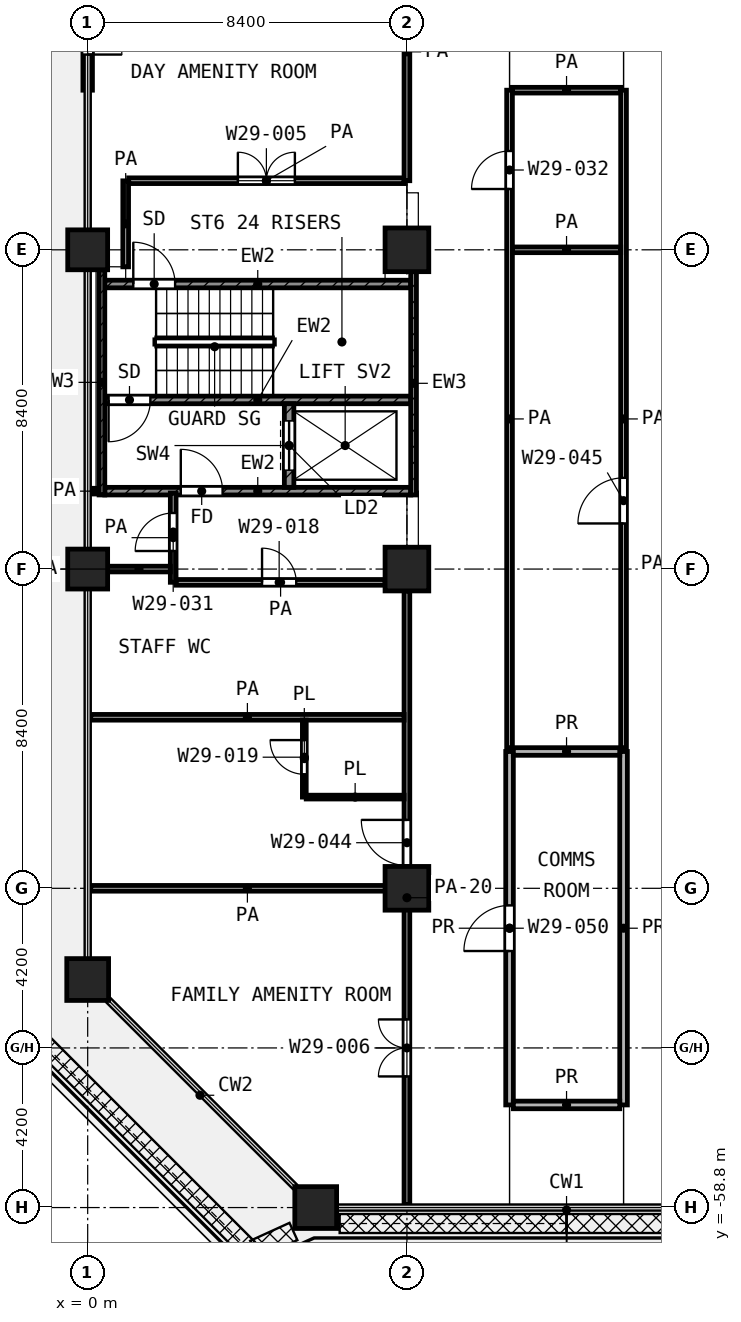
"""IFC4 building model, lengths in metres.
Left out: names, types, materials, properties, quantities, classifications, styles, units other than length and angle.
Written with IfcOpenShell. Run it as: python <this file> out.ifc"""

import sys

from ifc_helpers import new_model, si_unit, direction, frame, frame_2d, origin, origin_2d, place, context, subcontext, project, spatial, rectangle, extrude, element, fill, save


model = new_model("IFC4")
c1 = context("Model", 3, precision=1e-05, world=origin(), true_north=direction((0.0, 1.0)))
c2 = subcontext(c1, "Body", "Model", "MODEL_VIEW")
j1 = project(units=[si_unit("LENGTHUNIT", "METRE"), si_unit("PLANEANGLEUNIT", "RADIAN")], contexts=[c1])
p1 = place(None, origin())
s1 = spatial("IfcSite", under=j1, at=p1, CompositionType="ELEMENT")
p2 = place(p1, origin())
s2 = spatial("IfcBuilding", under=s1, at=p2, CompositionType="ELEMENT")
p3 = place(p2, frame((0.0, 0.0, 128.2)))
s3 = spatial("IfcBuildingStorey", under=s2, at=p3, CompositionType="ELEMENT", Elevation=128.2)
p4 = place(p3, frame((0.0, -33.6, 0.0), z_axis=(0.0, 0.0, 1.0), x_axis=(1.0, 0.0, 0.0)))
e1 = element("IfcColumn", 1, at=p4, inside=s3, PredefinedType="COLUMN", context=c2, shape_type="SweptSolid", body=[
    extrude(rectangle(XDim=1.05, YDim=1.05, at=origin_2d()), origin(), (0.0, 0.0, 1.0), 4.2),
])
p5 = place(p3, frame((8.4, -33.6, 0.0), z_axis=(0.0, 0.0, 1.0), x_axis=(1.0, 0.0, 0.0)))
e2 = element("IfcColumn", 2, at=p5, inside=s3, PredefinedType="COLUMN", context=c2, shape_type="SweptSolid", body=[
    extrude(rectangle(XDim=1.15, YDim=1.15, at=origin_2d()), origin(), (0.0, 0.0, 1.0), 4.2),
])
p6 = place(p3, frame((0.0, -42.0, 0.0), z_axis=(0.0, 0.0, 1.0), x_axis=(1.0, 0.0, 0.0)))
e3 = element("IfcColumn", 3, at=p6, inside=s3, PredefinedType="COLUMN", context=c2, shape_type="SweptSolid", body=[
    extrude(rectangle(XDim=1.05, YDim=1.05, at=origin_2d()), origin(), (0.0, 0.0, 1.0), 4.2),
])
for number, where, z_axis, x_axis in (
    (4, (8.4, -42.0, 0.0), (0.0, 0.0, 1.0), (1.0, 0.0, 0.0)),
    (5, (8.4, -50.4, 0.0), (0.0, 0.0, 1.0), (1.0, 0.0, 0.0)),
):
    element("IfcColumn", number, at=place(p3, frame(where, z_axis=z_axis, x_axis=x_axis)), inside=s3, PredefinedType="COLUMN", context=c2, shape_type="SweptSolid", body=[
        extrude(rectangle(XDim=1.15, YDim=1.15, at=origin_2d()), origin(), (0.0, 0.0, 1.0), 4.2),
    ])
for number, where, z_axis, x_axis in (
    (6, (0.0, -52.8, 0.0), (0.0, 0.0, 1.0), (1.0, 0.0, 0.0)),
    (7, (6.0, -58.8, 0.0), (0.0, 0.0, 1.0), (1.0, 0.0, 0.0)),
):
    element("IfcColumn", number, at=place(p3, frame(where, z_axis=z_axis, x_axis=x_axis)), inside=s3, PredefinedType="COLUMN", context=c2, shape_type="SweptSolid", body=[
        extrude(rectangle(XDim=1.1, YDim=1.1, at=origin_2d()), origin(), (0.0, 0.0, 1.0), 4.2),
    ])
p7 = place(p3, frame((0.0, -25.725, 0.0), z_axis=(0.0, 0.0, 1.0), x_axis=(0.0, -1.0, 0.0)))
e8 = element("IfcWall", 8, at=p7, inside=s3, PredefinedType="SOLIDWALL", context=c2, shape_type="SweptSolid", body=[
    extrude(rectangle(XDim=3.675, YDim=0.25, at=frame_2d((1.837, 0.0))), origin(), (0.0, 0.0, 1.0), 3.48),
])
p8 = place(p7, frame((0.938, 0.0, 0.0)))
e9 = element("IfcOpeningElement", 9, at=p8, cuts=e8, PredefinedType="OPENING", context=c2, shape_type="SweptSolid", body=[
    extrude(rectangle(XDim=1.8, YDim=2.1, at=frame_2d((0.9, 1.05))), frame((0.0, 0.135, 0.0), z_axis=(0.0, -1.0, 0.0), x_axis=(1.0, 0.0, 0.0)), (0.0, 0.0, 1.0), 0.27),
])
p9 = place(p3, frame((0.375, -40.05, 0.0), z_axis=(0.0, 0.0, 1.0), x_axis=(0.0, 1.0, 0.0)))
e10 = element("IfcWall", 10, at=p9, inside=s3, PredefinedType="SHEAR", context=c2, shape_type="SweptSolid", body=[
    extrude(rectangle(XDim=5.925, YDim=0.15, at=frame_2d((2.962, 0.0))), origin(), (0.0, 0.0, 1.0), 3.6),
])
p10 = place(p3, frame((8.575, -40.05, 0.0), z_axis=(0.0, 0.0, 1.0), x_axis=(0.0, 1.0, 0.0)))
e11 = element("IfcWall", 11, at=p10, inside=s3, PredefinedType="SHEAR", context=c2, shape_type="SweptSolid", body=[
    extrude(rectangle(XDim=5.875, YDim=0.15, at=frame_2d((2.938, 0.0))), origin(), (0.0, 0.0, 1.0), 3.6),
])
p11 = place(p3, frame((0.45, -34.5, 0.0), z_axis=(0.0, 0.0, 1.0), x_axis=(1.0, 0.0, 0.0)))
e12 = element("IfcWall", 12, at=p11, inside=s3, PredefinedType="SHEAR", context=c2, shape_type="SweptSolid", body=[
    extrude(rectangle(XDim=8.05, YDim=0.2, at=frame_2d((4.025, 0.0))), origin(), (0.0, 0.0, 1.0), 3.6),
])
p12 = place(p11, frame((0.75, 0.0, 0.0)))
e13 = element("IfcOpeningElement", 13, at=p12, cuts=e12, PredefinedType="OPENING", context=c2, shape_type="SweptSolid", body=[
    extrude(rectangle(XDim=1.1, YDim=2.1, at=frame_2d((0.55, 1.05))), frame((0.0, 0.11, 0.0), z_axis=(0.0, -1.0, 0.0), x_axis=(1.0, 0.0, 0.0)), (0.0, 0.0, 1.0), 0.22),
])
p13 = place(p3, frame((0.45, -37.55, 0.0), z_axis=(0.0, 0.0, 1.0), x_axis=(1.0, 0.0, 0.0)))
e14 = element("IfcWall", 14, at=p13, inside=s3, PredefinedType="SHEAR", context=c2, shape_type="SweptSolid", body=[
    extrude(rectangle(XDim=8.05, YDim=0.2, at=frame_2d((4.025, 0.0))), origin(), (0.0, 0.0, 1.0), 3.6),
])
p14 = place(p13, frame((0.1, 0.0, 0.0)))
e15 = element("IfcOpeningElement", 15, at=p14, cuts=e14, PredefinedType="OPENING", context=c2, shape_type="SweptSolid", body=[
    extrude(rectangle(XDim=1.1, YDim=2.1, at=frame_2d((0.55, 1.05))), frame((0.0, 0.11, 0.0), z_axis=(0.0, -1.0, 0.0), x_axis=(1.0, 0.0, 0.0)), (0.0, 0.0, 1.0), 0.22),
])
p15 = place(p3, frame((0.45, -39.95, 0.0), z_axis=(0.0, 0.0, 1.0), x_axis=(1.0, 0.0, 0.0)))
e16 = element("IfcWall", 16, at=p15, inside=s3, PredefinedType="SHEAR", context=c2, shape_type="SweptSolid", body=[
    extrude(rectangle(XDim=8.05, YDim=0.2, at=frame_2d((4.025, 0.0))), origin(), (0.0, 0.0, 1.0), 3.6),
])
p16 = place(p15, frame((2.0, 0.0, 0.0)))
e17 = element("IfcOpeningElement", 17, at=p16, cuts=e16, PredefinedType="OPENING", context=c2, shape_type="SweptSolid", body=[
    extrude(rectangle(XDim=1.1, YDim=2.1, at=frame_2d((0.55, 1.05))), frame((0.0, 0.11, 0.0), z_axis=(0.0, -1.0, 0.0), x_axis=(1.0, 0.0, 0.0)), (0.0, 0.0, 1.0), 0.22),
])
p17 = place(p3, frame((5.3, -39.85, 0.0), z_axis=(0.0, 0.0, 1.0), x_axis=(0.0, 1.0, 0.0)))
e18 = element("IfcWall", 18, at=p17, inside=s3, PredefinedType="SHEAR", context=c2, shape_type="SweptSolid", body=[
    extrude(rectangle(XDim=2.2, YDim=0.25, at=frame_2d((1.1, 0.0))), origin(), (0.0, 0.0, 1.0), 3.6),
])
p18 = place(p17, frame((0.45, 0.0, 0.0)))
e19 = element("IfcOpeningElement", 19, at=p18, cuts=e18, PredefinedType="OPENING", context=c2, shape_type="SweptSolid", body=[
    extrude(rectangle(XDim=1.3, YDim=2.1, at=frame_2d((0.65, 1.05))), frame((0.0, 0.135, 0.0), z_axis=(0.0, -1.0, 0.0), x_axis=(1.0, 0.0, 0.0)), (0.0, 0.0, 1.0), 0.27),
])
p19 = place(p3, frame((5.75, -48.0, 0.0), z_axis=(0.0, 0.0, 1.0), x_axis=(1.0, 0.0, 0.0)))
e20 = element("IfcWall", 20, at=p19, inside=s3, PredefinedType="PARTITIONING", context=c2, shape_type="SweptSolid", body=[
    extrude(rectangle(XDim=2.575, YDim=0.1, at=frame_2d((1.288, 0.0))), origin(), (0.0, 0.0, 1.0), 3.6),
])
p20 = place(p3, frame((5.7, -48.0, 0.0), z_axis=(0.0, 0.0, 1.0), x_axis=(0.0, 1.0, 0.0)))
e21 = element("IfcWall", 21, at=p20, inside=s3, PredefinedType="PARTITIONING", context=c2, shape_type="SweptSolid", body=[
    extrude(rectangle(XDim=2.025, YDim=0.1, at=frame_2d((1.012, 0.0))), origin(), (0.0, 0.0, 1.0), 3.6),
])
p21 = place(p20, frame((0.6, 0.0, 0.0)))
e22 = element("IfcOpeningElement", 22, at=p21, cuts=e21, PredefinedType="OPENING", context=c2, shape_type="SweptSolid", body=[
    extrude(rectangle(XDim=0.9, YDim=2.1, at=frame_2d((0.45, 1.05))), frame((0.0, 0.06, 0.0), z_axis=(0.0, -1.0, 0.0), x_axis=(1.0, 0.0, 0.0)), (0.0, 0.0, 1.0), 0.12),
])
for number, where, z_axis, x_axis in (
    (23, (0.08, -50.4, 0.0), (0.0, 0.0, 1.0), (1.0, 0.0, 0.0)),
    (24, (0.08, -45.9, 0.0), (0.0, 0.0, 1.0), (1.0, 0.0, 0.0)),
):
    element("IfcWall", number, at=place(p3, frame(where, z_axis=z_axis, x_axis=x_axis)), inside=s3, PredefinedType="PARTITIONING", context=c2, shape_type="SweptSolid", body=[
        extrude(rectangle(XDim=8.245, YDim=0.15, at=frame_2d((4.123, 0.0))), origin(), (0.0, 0.0, 1.0), 3.6),
    ])
p22 = place(p3, frame((2.327, -42.35, 0.0), z_axis=(0.0, 0.0, 1.0), x_axis=(1.0, 0.0, 0.0)))
e25 = element("IfcWall", 25, at=p22, inside=s3, PredefinedType="PARTITIONING", context=c2, shape_type="SweptSolid", body=[
    extrude(rectangle(XDim=5.498, YDim=0.15, at=frame_2d((2.749, 0.0))), origin(), (0.0, 0.0, 1.0), 3.6),
])
p23 = place(p22, frame((2.261, 0.0, 0.0)))
e26 = element("IfcOpeningElement", 26, at=p23, cuts=e25, PredefinedType="OPENING", context=c2, shape_type="SweptSolid", body=[
    extrude(rectangle(XDim=0.9, YDim=2.1, at=frame_2d((0.45, 1.05))), frame((0.0, 0.085, 0.0), z_axis=(0.0, -1.0, 0.0), x_axis=(1.0, 0.0, 0.0)), (0.0, 0.0, 1.0), 0.17),
])
p24 = place(p3, frame((0.525, -42.0, 0.0), z_axis=(0.0, 0.0, 1.0), x_axis=(1.0, 0.0, 0.0)))
e27 = element("IfcWall", 27, at=p24, inside=s3, PredefinedType="PARTITIONING", context=c2, shape_type="SweptSolid", body=[
    extrude(rectangle(XDim=1.65, YDim=0.15, at=frame_2d((0.825, 0.0))), origin(), (0.0, 0.0, 1.0), 3.6),
])
p25 = place(p3, frame((0.08, -39.95, 0.0), z_axis=(0.0, 0.0, 1.0), x_axis=(1.0, 0.0, 0.0)))
e28 = element("IfcWall", 28, at=p25, inside=s3, PredefinedType="PARTITIONING", context=c2, shape_type="SweptSolid", body=[
    extrude(rectangle(XDim=0.19, YDim=0.15, at=frame_2d((0.095, 0.0))), origin(), (0.0, 0.0, 1.0), 3.6),
])
p26 = place(p3, frame((11.175, -33.6, 0.0), z_axis=(0.0, 0.0, 1.0), x_axis=(1.0, 0.0, 0.0)))
e29 = element("IfcWall", 29, at=p26, inside=s3, PredefinedType="PARTITIONING", context=c2, shape_type="SweptSolid", body=[
    extrude(rectangle(XDim=2.85, YDim=0.15, at=frame_2d((1.425, 0.0))), origin(), (0.0, 0.0, 1.0), 3.6),
])
p27 = place(p3, frame((1.079, -31.782, 0.0), z_axis=(0.0, 0.0, 1.0), x_axis=(1.0, 0.0, 0.0)))
e30 = element("IfcWall", 30, at=p27, inside=s3, PredefinedType="PARTITIONING", context=c2, shape_type="SweptSolid", body=[
    extrude(rectangle(XDim=7.246, YDim=0.15, at=frame_2d((3.623, 0.0))), origin(), (0.0, 0.0, 1.0), 3.6),
])
p28 = place(p27, frame((2.873, 0.0, 0.0)))
e31 = element("IfcOpeningElement", 31, at=p28, cuts=e30, PredefinedType="OPENING", context=c2, shape_type="SweptSolid", body=[
    extrude(rectangle(XDim=1.5, YDim=2.1, at=frame_2d((0.75, 1.05))), frame((0.0, 0.085, 0.0), z_axis=(0.0, -1.0, 0.0), x_axis=(1.0, 0.0, 0.0)), (0.0, 0.0, 1.0), 0.17),
])
p29 = place(p3, frame((11.175, -29.4, 0.0), z_axis=(0.0, 0.0, 1.0), x_axis=(1.0, 0.0, 0.0)))
e32 = element("IfcWall", 32, at=p29, inside=s3, PredefinedType="PARTITIONING", context=c2, shape_type="SweptSolid", body=[
    extrude(rectangle(XDim=2.85, YDim=0.15, at=frame_2d((1.425, 0.0))), origin(), (0.0, 0.0, 1.0), 3.6),
])
p30 = place(p3, frame((1.0, -34.048, 0.0), z_axis=(0.0, 0.0, 1.0), x_axis=(0.0, 1.0, 0.0)))
e33 = element("IfcWall", 33, at=p30, inside=s3, PredefinedType="PARTITIONING", context=c2, shape_type="SweptSolid", body=[
    extrude(rectangle(XDim=2.263, YDim=0.15, at=frame_2d((1.132, 0.0))), origin(), (0.0, 0.0, 1.0), 3.6),
])
p31 = place(p3, frame((2.25, -42.348, 0.0), z_axis=(0.0, 0.0, 1.0), x_axis=(0.0, 1.0, 0.0)))
e34 = element("IfcWall", 34, at=p31, inside=s3, PredefinedType="PARTITIONING", context=c2, shape_type="SweptSolid", body=[
    extrude(rectangle(XDim=2.348, YDim=0.15, at=frame_2d((1.174, 0.0))), origin(), (0.0, 0.0, 1.0), 3.6),
])
p32 = place(p31, frame((0.823, 0.0, 0.0)))
e35 = element("IfcOpeningElement", 35, at=p32, cuts=e34, PredefinedType="OPENING", context=c2, shape_type="SweptSolid", body=[
    extrude(rectangle(XDim=1.0, YDim=2.1, at=frame_2d((0.5, 1.05))), frame((0.0, 0.085, 0.0), z_axis=(0.0, -1.0, 0.0), x_axis=(1.0, 0.0, 0.0)), (0.0, 0.0, 1.0), 0.17),
])
p33 = place(p3, frame((8.4, -58.72, 0.0), z_axis=(0.0, 0.0, 1.0), x_axis=(0.0, 1.0, 0.0)))
e36 = element("IfcWall", 36, at=p33, inside=s3, PredefinedType="PARTITIONING", context=c2, shape_type="SweptSolid", body=[
    extrude(rectangle(XDim=16.145, YDim=0.15, at=frame_2d((8.073, 0.0))), origin(), (0.0, 0.0, 1.0), 2.7),
])
p34 = place(p33, frame((8.92, 0.0, 0.0)))
e37 = element("IfcOpeningElement", 37, at=p34, cuts=e36, PredefinedType="OPENING", context=c2, shape_type="SweptSolid", body=[
    extrude(rectangle(XDim=1.2, YDim=2.1, at=frame_2d((0.6, 1.05))), frame((0.0, 0.085, 0.0), z_axis=(0.0, -1.0, 0.0), x_axis=(1.0, 0.0, 0.0)), (0.0, 0.0, 1.0), 0.17),
])
p35 = place(p33, frame((3.37, 0.0, 0.0)))
e38 = element("IfcOpeningElement", 38, at=p35, cuts=e36, PredefinedType="OPENING", context=c2, shape_type="SweptSolid", body=[
    extrude(rectangle(XDim=1.5, YDim=2.1, at=frame_2d((0.75, 1.05))), frame((0.0, 0.085, 0.0), z_axis=(0.0, -1.0, 0.0), x_axis=(1.0, 0.0, 0.0)), (0.0, 0.0, 1.0), 0.17),
])
p36 = place(p3, frame((8.4, -31.782, 0.0), z_axis=(0.0, 0.0, 1.0), x_axis=(0.0, 1.0, 0.0)))
e39 = element("IfcWall", 39, at=p36, inside=s3, PredefinedType="PARTITIONING", context=c2, shape_type="SweptSolid", body=[
    extrude(rectangle(XDim=6.782, YDim=0.15, at=frame_2d((3.391, 0.0))), origin(), (0.0, 0.0, 1.0), 3.6),
])
p37 = place(p3, frame((11.1, -46.7, 0.0), z_axis=(0.0, 0.0, 1.0), x_axis=(0.0, 1.0, 0.0)))
e40 = element("IfcWall", 40, at=p37, inside=s3, PredefinedType="PARTITIONING", context=c2, shape_type="SweptSolid", body=[
    extrude(rectangle(XDim=17.3, YDim=0.15, at=frame_2d((8.65, 0.0))), origin(), (0.0, 0.0, 1.0), 3.6),
])
p38 = place(p37, frame((14.7, 0.0, 0.0)))
e41 = element("IfcOpeningElement", 41, at=p38, cuts=e40, PredefinedType="OPENING", context=c2, shape_type="SweptSolid", body=[
    extrude(rectangle(XDim=1.0, YDim=2.1, at=frame_2d((0.5, 1.05))), frame((0.0, 0.085, 0.0), z_axis=(0.0, -1.0, 0.0), x_axis=(1.0, 0.0, 0.0)), (0.0, 0.0, 1.0), 0.17),
])
p39 = place(p3, frame((14.1, -46.7, 0.0), z_axis=(0.0, 0.0, 1.0), x_axis=(0.0, 1.0, 0.0)))
e42 = element("IfcWall", 42, at=p39, inside=s3, PredefinedType="PARTITIONING", context=c2, shape_type="SweptSolid", body=[
    extrude(rectangle(XDim=17.3, YDim=0.15, at=frame_2d((8.65, 0.0))), origin(), (0.0, 0.0, 1.0), 3.6),
])
p40 = place(p39, frame((5.9, 0.0, 0.0)))
e43 = element("IfcOpeningElement", 43, at=p40, cuts=e42, PredefinedType="OPENING", context=c2, shape_type="SweptSolid", body=[
    extrude(rectangle(XDim=1.2, YDim=2.1, at=frame_2d((0.6, 1.05))), frame((0.0, 0.085, 0.0), z_axis=(0.0, -1.0, 0.0), x_axis=(1.0, 0.0, 0.0)), (0.0, 0.0, 1.0), 0.17),
])
for number, where, z_axis, x_axis in (
    (44, (11.2, -56.1, 0.0), (0.0, 0.0, 1.0), (1.0, 0.0, 0.0)),
    (45, (11.2, -46.8, 0.0), (0.0, 0.0, 1.0), (1.0, 0.0, 0.0)),
):
    element("IfcWall", number, at=place(p3, frame(where, z_axis=z_axis, x_axis=x_axis)), inside=s3, PredefinedType="PARTITIONING", context=c2, shape_type="SweptSolid", body=[
        extrude(rectangle(XDim=2.8, YDim=0.2, at=frame_2d((1.4, 0.0))), origin(), (0.0, 0.0, 1.0), 3.6),
    ])
p41 = place(p3, frame((11.1, -56.1, 0.0), z_axis=(0.0, 0.0, 1.0), x_axis=(0.0, 1.0, 0.0)))
e46 = element("IfcWall", 46, at=p41, inside=s3, PredefinedType="PARTITIONING", context=c2, shape_type="SweptSolid", body=[
    extrude(rectangle(XDim=9.3, YDim=0.2, at=frame_2d((4.65, 0.0))), origin(), (0.0, 0.0, 1.0), 3.6),
])
p42 = place(p41, frame((4.05, 0.0, 0.0)))
e47 = element("IfcOpeningElement", 47, at=p42, cuts=e46, PredefinedType="OPENING", context=c2, shape_type="SweptSolid", body=[
    extrude(rectangle(XDim=1.2, YDim=2.1, at=frame_2d((0.6, 1.05))), frame((0.0, 0.11, 0.0), z_axis=(0.0, -1.0, 0.0), x_axis=(1.0, 0.0, 0.0)), (0.0, 0.0, 1.0), 0.22),
])
p43 = place(p3, frame((14.1, -56.1, 0.0), z_axis=(0.0, 0.0, 1.0), x_axis=(0.0, 1.0, 0.0)))
e48 = element("IfcWall", 48, at=p43, inside=s3, PredefinedType="PARTITIONING", context=c2, shape_type="SweptSolid", body=[
    extrude(rectangle(XDim=9.3, YDim=0.2, at=frame_2d((4.65, 0.0))), origin(), (0.0, 0.0, 1.0), 3.6),
])
p44 = place(p8, origin())
e49 = element("IfcDoor", 49, at=p44, inside=s3, OperationType="DOUBLE_DOOR_SINGLE_SWING", PredefinedType="DOOR", context=c2, shape_type="SweptSolid", body=[
    extrude(rectangle(XDim=1.8, YDim=2.1, at=frame_2d((0.9, 1.05))), frame((0.0, 0.025, 0.0), z_axis=(0.0, -1.0, 0.0), x_axis=(1.0, 0.0, 0.0)), (0.0, 0.0, 1.0), 0.05),
])
fill(e9, e49)
p45 = place(p12, origin())
e50 = element("IfcDoor", 50, at=p45, inside=s3, OperationType="SINGLE_SWING_LEFT", PredefinedType="DOOR", context=c2, shape_type="SweptSolid", body=[
    extrude(rectangle(XDim=1.1, YDim=2.1, at=frame_2d((0.55, 1.05))), frame((0.0, 0.025, 0.0), z_axis=(0.0, -1.0, 0.0), x_axis=(1.0, 0.0, 0.0)), (0.0, 0.0, 1.0), 0.05),
])
fill(e13, e50)
p46 = place(p14, frame((1.1, 0.0, 0.0), z_axis=(0.0, 0.0, 1.0), x_axis=(-1.0, 0.0, 0.0)))
e51 = element("IfcDoor", 51, at=p46, inside=s3, OperationType="SINGLE_SWING_LEFT", PredefinedType="DOOR", context=c2, shape_type="SweptSolid", body=[
    extrude(rectangle(XDim=1.1, YDim=2.1, at=frame_2d((0.55, 1.05))), frame((0.0, 0.025, 0.0), z_axis=(0.0, -1.0, 0.0), x_axis=(1.0, 0.0, 0.0)), (0.0, 0.0, 1.0), 0.05),
])
fill(e15, e51)
p47 = place(p18, origin())
e52 = element("IfcDoor", 52, at=p47, inside=s3, OperationType="DOUBLE_DOOR_SLIDING", PredefinedType="DOOR", context=c2, shape_type="SweptSolid", body=[
    extrude(rectangle(XDim=1.3, YDim=2.1, at=frame_2d((0.65, 1.05))), frame((0.0, 0.025, 0.0), z_axis=(0.0, -1.0, 0.0), x_axis=(1.0, 0.0, 0.0)), (0.0, 0.0, 1.0), 0.05),
])
fill(e19, e52)
p48 = place(p16, origin())
e53 = element("IfcDoor", 53, at=p48, inside=s3, OperationType="SINGLE_SWING_LEFT", PredefinedType="DOOR", context=c2, shape_type="SweptSolid", body=[
    extrude(rectangle(XDim=1.1, YDim=2.1, at=frame_2d((0.55, 1.05))), frame((0.0, 0.025, 0.0), z_axis=(0.0, -1.0, 0.0), x_axis=(1.0, 0.0, 0.0)), (0.0, 0.0, 1.0), 0.05),
])
fill(e17, e53)
p49 = place(p28, origin())
e54 = element("IfcDoor", 54, at=p49, inside=s3, OperationType="DOUBLE_DOOR_SINGLE_SWING", PredefinedType="DOOR", context=c2, shape_type="SweptSolid", body=[
    extrude(rectangle(XDim=1.5, YDim=2.1, at=frame_2d((0.75, 1.05))), frame((0.0, 0.025, 0.0), z_axis=(0.0, -1.0, 0.0), x_axis=(1.0, 0.0, 0.0)), (0.0, 0.0, 1.0), 0.05),
])
fill(e31, e54)
p50 = place(p32, origin())
e55 = element("IfcDoor", 55, at=p50, inside=s3, OperationType="SINGLE_SWING_LEFT", PredefinedType="DOOR", context=c2, shape_type="SweptSolid", body=[
    extrude(rectangle(XDim=1.0, YDim=2.1, at=frame_2d((0.5, 1.05))), frame((0.0, 0.025, 0.0), z_axis=(0.0, -1.0, 0.0), x_axis=(1.0, 0.0, 0.0)), (0.0, 0.0, 1.0), 0.05),
])
fill(e35, e55)
p51 = place(p23, origin())
e56 = element("IfcDoor", 56, at=p51, inside=s3, OperationType="SINGLE_SWING_LEFT", PredefinedType="DOOR", context=c2, shape_type="SweptSolid", body=[
    extrude(rectangle(XDim=0.9, YDim=2.1, at=frame_2d((0.45, 1.05))), frame((0.0, 0.025, 0.0), z_axis=(0.0, -1.0, 0.0), x_axis=(1.0, 0.0, 0.0)), (0.0, 0.0, 1.0), 0.05),
])
fill(e26, e56)
p52 = place(p34, origin())
e57 = element("IfcDoor", 57, at=p52, inside=s3, OperationType="SINGLE_SWING_RIGHT", PredefinedType="DOOR", context=c2, shape_type="SweptSolid", body=[
    extrude(rectangle(XDim=1.2, YDim=2.1, at=frame_2d((0.6, 1.05))), frame((0.0, 0.025, 0.0), z_axis=(0.0, -1.0, 0.0), x_axis=(1.0, 0.0, 0.0)), (0.0, 0.0, 1.0), 0.05),
])
fill(e37, e57)
p53 = place(p21, origin())
e58 = element("IfcDoor", 58, at=p53, inside=s3, OperationType="SINGLE_SWING_RIGHT", PredefinedType="DOOR", context=c2, shape_type="SweptSolid", body=[
    extrude(rectangle(XDim=0.9, YDim=2.1, at=frame_2d((0.45, 1.05))), frame((0.0, 0.025, 0.0), z_axis=(0.0, -1.0, 0.0), x_axis=(1.0, 0.0, 0.0)), (0.0, 0.0, 1.0), 0.05),
])
fill(e22, e58)
p54 = place(p35, origin())
e59 = element("IfcDoor", 59, at=p54, inside=s3, OperationType="DOUBLE_DOOR_SINGLE_SWING", PredefinedType="DOOR", context=c2, shape_type="SweptSolid", body=[
    extrude(rectangle(XDim=1.5, YDim=2.1, at=frame_2d((0.75, 1.05))), frame((0.0, 0.025, 0.0), z_axis=(0.0, -1.0, 0.0), x_axis=(1.0, 0.0, 0.0)), (0.0, 0.0, 1.0), 0.05),
])
fill(e38, e59)
p55 = place(p38, origin())
e60 = element("IfcDoor", 60, at=p55, inside=s3, OperationType="SINGLE_SWING_LEFT", PredefinedType="DOOR", context=c2, shape_type="SweptSolid", body=[
    extrude(rectangle(XDim=1.0, YDim=2.1, at=frame_2d((0.5, 1.05))), frame((0.0, 0.025, 0.0), z_axis=(0.0, -1.0, 0.0), x_axis=(1.0, 0.0, 0.0)), (0.0, 0.0, 1.0), 0.05),
])
fill(e41, e60)
p56 = place(p40, origin())
e61 = element("IfcDoor", 61, at=p56, inside=s3, OperationType="SINGLE_SWING_LEFT", PredefinedType="DOOR", context=c2, shape_type="SweptSolid", body=[
    extrude(rectangle(XDim=1.2, YDim=2.1, at=frame_2d((0.6, 1.05))), frame((0.0, 0.025, 0.0), z_axis=(0.0, -1.0, 0.0), x_axis=(1.0, 0.0, 0.0)), (0.0, 0.0, 1.0), 0.05),
])
fill(e43, e61)
p57 = place(p42, origin())
e62 = element("IfcDoor", 62, at=p57, inside=s3, OperationType="SINGLE_SWING_LEFT", PredefinedType="DOOR", context=c2, shape_type="SweptSolid", body=[
    extrude(rectangle(XDim=1.2, YDim=2.1, at=frame_2d((0.6, 1.05))), frame((0.0, 0.025, 0.0), z_axis=(0.0, -1.0, 0.0), x_axis=(1.0, 0.0, 0.0)), (0.0, 0.0, 1.0), 0.05),
])
fill(e47, e62)
save(model, sys.argv[1])
